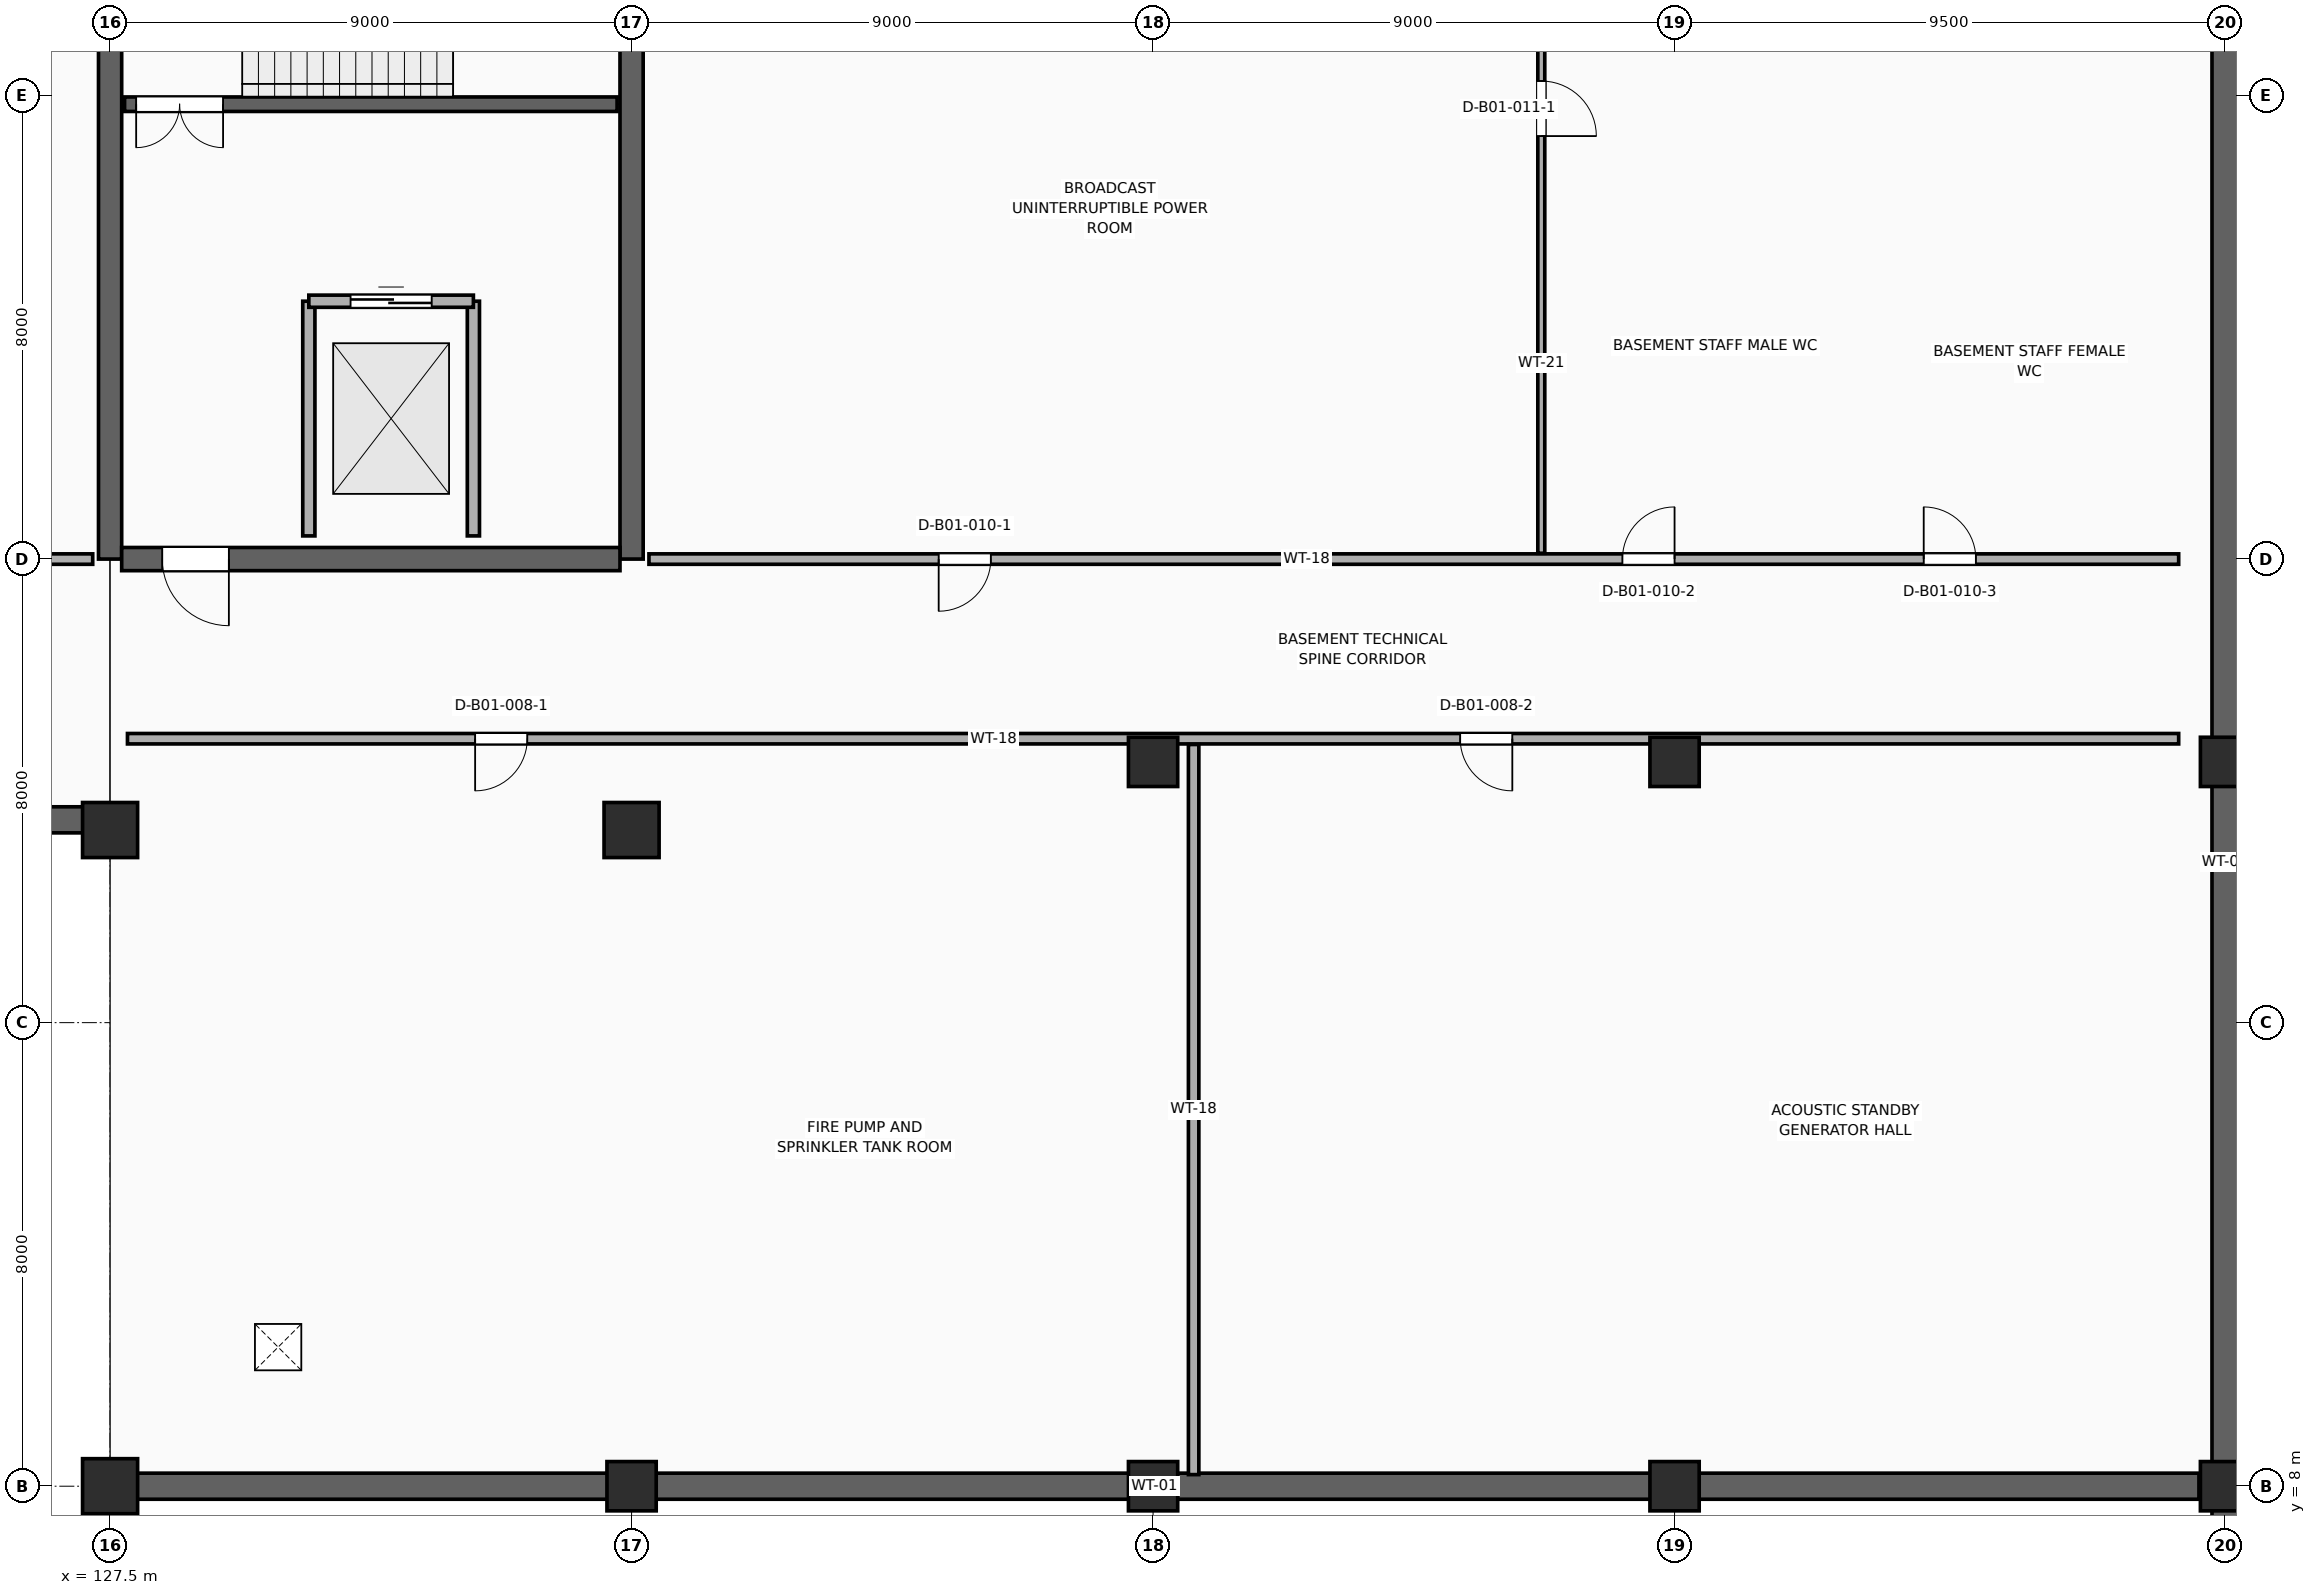
"""IFC4 building model, lengths in metres.
Left out: names, types, materials, properties, quantities, classifications, styles, units other than length and angle.
Written with IfcOpenShell. Run it as: python <this file> out.ifc"""

import sys

from ifc_helpers import new_model, si_unit, direction, frame, frame_2d, origin, origin_2d, place, context, subcontext, project, spatial, rectangle, extrude, element, fill, save


model = new_model("IFC4")
c1 = context("Model", 3, precision=1e-05, world=origin(), true_north=direction((0.0, 1.0)))
c2 = subcontext(c1, "Body", "Model", "MODEL_VIEW")
j1 = project(units=[si_unit("LENGTHUNIT", "METRE"), si_unit("PLANEANGLEUNIT", "RADIAN")], contexts=[c1])
p1 = place(None, origin())
s1 = spatial("IfcSite", under=j1, at=p1, CompositionType="ELEMENT")
p2 = place(p1, origin())
s2 = spatial("IfcBuilding", under=s1, at=p2, CompositionType="ELEMENT")
p3 = place(p2, frame((0.0, 0.0, -4.8)))
s3 = spatial("IfcBuildingStorey", under=s2, at=p3, CompositionType="ELEMENT", Elevation=-4.8)
p4 = place(p3, frame((76.5, 19.5, 0.0), z_axis=(0.0, 0.0, 1.0), x_axis=(1.0, 0.0, 0.0)))
e1 = element("IfcWall", 1, at=p4, inside=s3, PredefinedType="SHEAR", context=c2, shape_type="SweptSolid", body=[
    extrude(rectangle(XDim=51.0, YDim=0.45, at=frame_2d((25.5, 0.0))), origin(), (0.0, 0.0, 1.0), 4.42),
])
p5 = place(p3, frame((127.5, 8.0, 0.0), z_axis=(0.0, 0.0, 1.0), x_axis=(1.0, 0.0, 0.0)))
e2 = element("IfcWall", 2, at=p5, inside=s3, PredefinedType="SHEAR", context=c2, shape_type="SweptSolid", body=[
    extrude(rectangle(XDim=36.05, YDim=0.45, at=frame_2d((18.025, 0.0))), origin(), (0.0, 0.0, 1.0), 4.42),
])
p6 = place(p3, frame((164.0, 0.25, 0.0), z_axis=(0.0, 0.0, 1.0), x_axis=(0.0, 1.0, 0.0)))
e3 = element("IfcWall", 3, at=p6, inside=s3, PredefinedType="SHEAR", context=c2, shape_type="SweptSolid", body=[
    extrude(rectangle(XDim=113.5, YDim=0.45, at=frame_2d((56.75, 0.0))), origin(), (0.0, 0.0, 1.0), 4.42),
])
for number, where, z_axis, x_axis in (
    (4, (127.5, 24.0, 0.0), (0.0, 0.0, 1.0), (0.0, 1.0, 0.0)),
    (5, (136.5, 24.0, 0.0), (0.0, 0.0, 1.0), (0.0, 1.0, 0.0)),
):
    element("IfcWall", number, at=place(p3, frame(where, z_axis=z_axis, x_axis=x_axis)), inside=s3, PredefinedType="SHEAR", context=c2, shape_type="SweptSolid", body=[
        extrude(rectangle(XDim=12.8, YDim=0.4, at=frame_2d((6.4, 0.0))), origin(), (0.0, 0.0, 1.0), 4.64),
    ])
p7 = place(p3, frame((127.7, 24.0, 0.0), z_axis=(0.0, 0.0, 1.0), x_axis=(1.0, 0.0, 0.0)))
e6 = element("IfcWall", 6, at=p7, inside=s3, PredefinedType="SHEAR", context=c2, shape_type="SweptSolid", body=[
    extrude(rectangle(XDim=8.6, YDim=0.4, at=frame_2d((4.3, 0.0))), origin(), (0.0, 0.0, 1.0), 4.64),
])
p8 = place(p7, frame((0.7, 0.0, 0.0)))
e7 = element("IfcOpeningElement", 7, at=p8, cuts=e6, PredefinedType="OPENING", context=c2, shape_type="SweptSolid", body=[
    extrude(rectangle(XDim=1.15, YDim=2.2, at=frame_2d((0.575, 1.1))), frame((0.0, 0.212, 0.0), z_axis=(0.0, -1.0, 0.0), x_axis=(1.0, 0.0, 0.0)), (0.0, 0.0, 1.0), 0.424),
])
p9 = place(p3, frame((127.75, 31.85, 0.0), z_axis=(0.0, 0.0, 1.0), x_axis=(1.0, 0.0, 0.0)))
e8 = element("IfcWall", 8, at=p9, inside=s3, PredefinedType="STANDARD", context=c2, shape_type="SweptSolid", body=[
    extrude(rectangle(XDim=8.5, YDim=0.25, at=frame_2d((4.25, 0.0))), origin(), (0.0, 0.0, 1.0), 4.64),
])
p10 = place(p9, frame((0.2, 0.0, 0.0)))
e9 = element("IfcOpeningElement", 9, at=p10, cuts=e8, PredefinedType="OPENING", context=c2, shape_type="SweptSolid", body=[
    extrude(rectangle(XDim=1.5, YDim=2.2, at=frame_2d((0.75, 1.1))), frame((0.0, 0.137, 0.0), z_axis=(0.0, -1.0, 0.0), x_axis=(1.0, 0.0, 0.0)), (0.0, 0.0, 1.0), 0.274),
])
for number, where, z_axis, x_axis in (
    (10, (130.93, 24.4, 0.0), (0.0, 0.0, 1.0), (0.0, 1.0, 0.0)),
    (11, (133.77, 24.4, 0.0), (0.0, 0.0, 1.0), (0.0, 1.0, 0.0)),
):
    element("IfcWall", number, at=place(p3, frame(where, z_axis=z_axis, x_axis=x_axis)), inside=s3, PredefinedType="PARTITIONING", context=c2, shape_type="SweptSolid", body=[
        extrude(rectangle(XDim=4.05, YDim=0.21, at=frame_2d((2.025, 0.0))), origin(), (0.0, 0.0, 1.0), 4.64),
    ])
p11 = place(p3, frame((130.93, 28.45, 0.0), z_axis=(0.0, 0.0, 1.0), x_axis=(1.0, 0.0, 0.0)))
e12 = element("IfcWall", 12, at=p11, inside=s3, PredefinedType="PARTITIONING", context=c2, shape_type="SweptSolid", body=[
    extrude(rectangle(XDim=2.84, YDim=0.21, at=frame_2d((1.42, 0.0))), origin(), (0.0, 0.0, 1.0), 4.64),
])
p12 = place(p11, frame((0.72, 0.0, 0.0)))
e13 = element("IfcOpeningElement", 13, at=p12, cuts=e12, PredefinedType="OPENING", context=c2, shape_type="SweptSolid", body=[
    extrude(rectangle(XDim=1.4, YDim=2.35, at=frame_2d((0.7, 1.175))), frame((0.0, 0.117, 0.0), z_axis=(0.0, -1.0, 0.0), x_axis=(1.0, 0.0, 0.0)), (0.0, 0.0, 1.0), 0.234),
])
p13 = place(p3, frame((127.5, 8.0, 0.0), z_axis=(0.0, 0.0, 1.0), x_axis=(1.0, 0.0, 0.0)))
e14 = element("IfcColumn", 14, at=p13, inside=s3, PredefinedType="COLUMN", context=c2, shape_type="SweptSolid", body=[
    extrude(rectangle(XDim=0.95, YDim=0.95, at=origin_2d()), origin(), (0.0, 0.0, 1.0), 4.42),
])
for number, where, z_axis, x_axis in (
    (15, (136.5, 8.0, 0.0), (0.0, 0.0, 1.0), (1.0, 0.0, 0.0)),
    (16, (145.5, 8.0, 0.0), (0.0, 0.0, 1.0), (1.0, 0.0, 0.0)),
    (17, (145.5, 20.5, 0.0), (0.0, 0.0, 1.0), (1.0, 0.0, 0.0)),
    (18, (154.5, 8.0, 0.0), (0.0, 0.0, 1.0), (1.0, 0.0, 0.0)),
    (19, (154.5, 20.5, 0.0), (0.0, 0.0, 1.0), (1.0, 0.0, 0.0)),
    (20, (164.0, 8.0, 0.0), (0.0, 0.0, 1.0), (1.0, 0.0, 0.0)),
    (21, (164.0, 20.5, 0.0), (0.0, 0.0, 1.0), (1.0, 0.0, 0.0)),
):
    element("IfcColumn", number, at=place(p3, frame(where, z_axis=z_axis, x_axis=x_axis)), inside=s3, PredefinedType="COLUMN", context=c2, shape_type="SweptSolid", body=[
        extrude(rectangle(XDim=0.85, YDim=0.85, at=origin_2d()), origin(), (0.0, 0.0, 1.0), 4.42),
    ])
for number, where, z_axis, x_axis in (
    (22, (136.5, 19.324, 0.0), (0.0, 0.0, 1.0), (1.0, 0.0, 0.0)),
    (23, (127.5, 19.324, 0.0), (0.0, 0.0, 1.0), (1.0, 0.0, 0.0)),
):
    element("IfcColumn", number, at=place(p3, frame(where, z_axis=z_axis, x_axis=x_axis)), inside=s3, PredefinedType="COLUMN", context=c2, shape_type="SweptSolid", body=[
        extrude(rectangle(XDim=0.95, YDim=0.95, at=origin_2d()), origin(), (0.0, 0.0, 1.0), 4.42),
    ])
p14 = place(p3, frame((76.8, 24.0, 0.0), z_axis=(0.0, 0.0, 1.0), x_axis=(1.0, 0.0, 0.0)))
e24 = element("IfcWall", 24, at=p14, inside=s3, PredefinedType="PARTITIONING", context=c2, shape_type="SweptSolid", body=[
    extrude(rectangle(XDim=50.4, YDim=0.18, at=frame_2d((25.2, 0.0))), origin(), (0.0, 0.0, 1.0), 3.56),
])
p15 = place(p14, frame((8.0, 0.0, 0.0)))
e25 = element("IfcOpeningElement", 25, at=p15, cuts=e24, PredefinedType="OPENING", context=c2, shape_type="SweptSolid", body=[
    extrude(rectangle(XDim=0.9, YDim=2.1, at=frame_2d((0.45, 1.05))), frame((0.0, 0.102, 0.0), z_axis=(0.0, -1.0, 0.0), x_axis=(1.0, 0.0, 0.0)), (0.0, 0.0, 1.0), 0.204),
])
p16 = place(p14, frame((34.0, 0.0, 0.0)))
e26 = element("IfcOpeningElement", 26, at=p16, cuts=e24, PredefinedType="OPENING", context=c2, shape_type="SweptSolid", body=[
    extrude(rectangle(XDim=0.9, YDim=2.1, at=frame_2d((0.45, 1.05))), frame((0.0, 0.102, 0.0), z_axis=(0.0, -1.0, 0.0), x_axis=(1.0, 0.0, 0.0)), (0.0, 0.0, 1.0), 0.204),
])
p17 = place(p3, frame((127.8, 20.9, 0.0), z_axis=(0.0, 0.0, 1.0), x_axis=(1.0, 0.0, 0.0)))
e27 = element("IfcWall", 27, at=p17, inside=s3, PredefinedType="PARTITIONING", context=c2, shape_type="SweptSolid", body=[
    extrude(rectangle(XDim=35.4, YDim=0.18, at=frame_2d((17.7, 0.0))), origin(), (0.0, 0.0, 1.0), 3.51),
])
p18 = place(p17, frame((6.0, 0.0, 0.0)))
e28 = element("IfcOpeningElement", 28, at=p18, cuts=e27, PredefinedType="OPENING", context=c2, shape_type="SweptSolid", body=[
    extrude(rectangle(XDim=0.9, YDim=2.1, at=frame_2d((0.45, 1.05))), frame((0.0, 0.102, 0.0), z_axis=(0.0, -1.0, 0.0), x_axis=(1.0, 0.0, 0.0)), (0.0, 0.0, 1.0), 0.204),
])
p19 = place(p17, frame((23.0, 0.0, 0.0)))
e29 = element("IfcOpeningElement", 29, at=p19, cuts=e27, PredefinedType="OPENING", context=c2, shape_type="SweptSolid", body=[
    extrude(rectangle(XDim=0.9, YDim=2.1, at=frame_2d((0.45, 1.05))), frame((0.0, 0.102, 0.0), z_axis=(0.0, -1.0, 0.0), x_axis=(1.0, 0.0, 0.0)), (0.0, 0.0, 1.0), 0.204),
])
p20 = place(p3, frame((146.2, 8.2, 0.0), z_axis=(0.0, 0.0, 1.0), x_axis=(0.0, 1.0, 0.0)))
e30 = element("IfcWall", 30, at=p20, inside=s3, PredefinedType="PARTITIONING", context=c2, shape_type="SweptSolid", body=[
    extrude(rectangle(XDim=12.6, YDim=0.18, at=frame_2d((6.3, 0.0))), origin(), (0.0, 0.0, 1.0), 3.56),
])
p21 = place(p3, frame((136.8, 24.0, 0.0), z_axis=(0.0, 0.0, 1.0), x_axis=(1.0, 0.0, 0.0)))
e31 = element("IfcWall", 31, at=p21, inside=s3, PredefinedType="PARTITIONING", context=c2, shape_type="SweptSolid", body=[
    extrude(rectangle(XDim=26.4, YDim=0.18, at=frame_2d((13.2, 0.0))), origin(), (0.0, 0.0, 1.0), 3.51),
])
p22 = place(p21, frame((5.0, 0.0, 0.0)))
e32 = element("IfcOpeningElement", 32, at=p22, cuts=e31, PredefinedType="OPENING", context=c2, shape_type="SweptSolid", body=[
    extrude(rectangle(XDim=0.9, YDim=2.1, at=frame_2d((0.45, 1.05))), frame((0.0, 0.102, 0.0), z_axis=(0.0, -1.0, 0.0), x_axis=(1.0, 0.0, 0.0)), (0.0, 0.0, 1.0), 0.204),
])
p23 = place(p21, frame((16.8, 0.0, 0.0)))
e33 = element("IfcOpeningElement", 33, at=p23, cuts=e31, PredefinedType="OPENING", context=c2, shape_type="SweptSolid", body=[
    extrude(rectangle(XDim=0.9, YDim=2.15, at=frame_2d((0.45, 1.075))), frame((0.0, 0.102, 0.0), z_axis=(0.0, -1.0, 0.0), x_axis=(1.0, 0.0, 0.0)), (0.0, 0.0, 1.0), 0.204),
])
p24 = place(p21, frame((22.0, 0.0, 0.0)))
e34 = element("IfcOpeningElement", 34, at=p24, cuts=e31, PredefinedType="OPENING", context=c2, shape_type="SweptSolid", body=[
    extrude(rectangle(XDim=0.9, YDim=2.15, at=frame_2d((0.45, 1.075))), frame((0.0, 0.102, 0.0), z_axis=(0.0, -1.0, 0.0), x_axis=(1.0, 0.0, 0.0)), (0.0, 0.0, 1.0), 0.204),
])
p25 = place(p3, frame((152.2, 24.1, 0.0), z_axis=(0.0, 0.0, 1.0), x_axis=(0.0, 1.0, 0.0)))
e35 = element("IfcWall", 35, at=p25, inside=s3, PredefinedType="PARTITIONING", context=c2, shape_type="SweptSolid", body=[
    extrude(rectangle(XDim=12.5, YDim=0.12, at=frame_2d((6.25, 0.0))), origin(), (0.0, 0.0, 1.0), 3.56),
])
p26 = place(p25, frame((7.2, 0.0, 0.0)))
e36 = element("IfcOpeningElement", 36, at=p26, cuts=e35, PredefinedType="OPENING", context=c2, shape_type="SweptSolid", body=[
    extrude(rectangle(XDim=0.95, YDim=2.15, at=frame_2d((0.475, 1.075))), frame((0.0, 0.072, 0.0), z_axis=(0.0, -1.0, 0.0), x_axis=(1.0, 0.0, 0.0)), (0.0, 0.0, 1.0), 0.144),
])
p27 = place(p10, frame((1.5, 0.0, 0.0), z_axis=(0.0, 0.0, 1.0), x_axis=(-1.0, 0.0, 0.0)))
e37 = element("IfcDoor", 37, at=p27, inside=s3, OperationType="DOUBLE_DOOR_SINGLE_SWING", PredefinedType="DOOR", context=c2, shape_type="SweptSolid", body=[
    extrude(rectangle(XDim=1.5, YDim=2.2, at=frame_2d((0.75, 1.1))), frame((0.0, 0.025, 0.0), z_axis=(0.0, -1.0, 0.0), x_axis=(1.0, 0.0, 0.0)), (0.0, 0.0, 1.0), 0.05),
])
fill(e9, e37)
p28 = place(p12, origin())
e38 = element("IfcDoor", 38, at=p28, inside=s3, OperationType="DOUBLE_DOOR_SLIDING", PredefinedType="DOOR", context=c2, shape_type="SweptSolid", body=[
    extrude(rectangle(XDim=1.4, YDim=2.35, at=frame_2d((0.7, 1.175))), frame((0.0, 0.025, 0.0), z_axis=(0.0, -1.0, 0.0), x_axis=(1.0, 0.0, 0.0)), (0.0, 0.0, 1.0), 0.05),
])
fill(e13, e38)
p29 = place(p8, frame((1.15, 0.0, 0.0), z_axis=(0.0, 0.0, 1.0), x_axis=(-1.0, 0.0, 0.0)))
e39 = element("IfcDoor", 39, at=p29, inside=s3, OperationType="SINGLE_SWING_RIGHT", PredefinedType="DOOR", context=c2, shape_type="SweptSolid", body=[
    extrude(rectangle(XDim=1.15, YDim=2.2, at=frame_2d((0.575, 1.1))), frame((0.0, 0.025, 0.0), z_axis=(0.0, -1.0, 0.0), x_axis=(1.0, 0.0, 0.0)), (0.0, 0.0, 1.0), 0.05),
])
fill(e7, e39)
p30 = place(p18, frame((0.9, 0.0, 0.0), z_axis=(0.0, 0.0, 1.0), x_axis=(-1.0, 0.0, 0.0)))
e40 = element("IfcDoor", 40, at=p30, inside=s3, OperationType="SINGLE_SWING_LEFT", PredefinedType="DOOR", context=c2, shape_type="SweptSolid", body=[
    extrude(rectangle(XDim=0.9, YDim=2.1, at=frame_2d((0.45, 1.05))), frame((0.0, 0.025, 0.0), z_axis=(0.0, -1.0, 0.0), x_axis=(1.0, 0.0, 0.0)), (0.0, 0.0, 1.0), 0.05),
])
fill(e28, e40)
p31 = place(p19, frame((0.9, 0.0, 0.0), z_axis=(0.0, 0.0, 1.0), x_axis=(-1.0, 0.0, 0.0)))
e41 = element("IfcDoor", 41, at=p31, inside=s3, OperationType="SINGLE_SWING_RIGHT", PredefinedType="DOOR", context=c2, shape_type="SweptSolid", body=[
    extrude(rectangle(XDim=0.9, YDim=2.1, at=frame_2d((0.45, 1.05))), frame((0.0, 0.025, 0.0), z_axis=(0.0, -1.0, 0.0), x_axis=(1.0, 0.0, 0.0)), (0.0, 0.0, 1.0), 0.05),
])
fill(e29, e41)
p32 = place(p22, frame((0.9, 0.0, 0.0), z_axis=(0.0, 0.0, 1.0), x_axis=(-1.0, 0.0, 0.0)))
e42 = element("IfcDoor", 42, at=p32, inside=s3, OperationType="SINGLE_SWING_LEFT", PredefinedType="DOOR", context=c2, shape_type="SweptSolid", body=[
    extrude(rectangle(XDim=0.9, YDim=2.1, at=frame_2d((0.45, 1.05))), frame((0.0, 0.025, 0.0), z_axis=(0.0, -1.0, 0.0), x_axis=(1.0, 0.0, 0.0)), (0.0, 0.0, 1.0), 0.05),
])
fill(e32, e42)
p33 = place(p23, origin())
e43 = element("IfcDoor", 43, at=p33, inside=s3, OperationType="SINGLE_SWING_RIGHT", PredefinedType="DOOR", context=c2, shape_type="SweptSolid", body=[
    extrude(rectangle(XDim=0.9, YDim=2.15, at=frame_2d((0.45, 1.075))), frame((0.0, 0.025, 0.0), z_axis=(0.0, -1.0, 0.0), x_axis=(1.0, 0.0, 0.0)), (0.0, 0.0, 1.0), 0.05),
])
fill(e33, e43)
p34 = place(p24, origin())
e44 = element("IfcDoor", 44, at=p34, inside=s3, OperationType="SINGLE_SWING_LEFT", PredefinedType="DOOR", context=c2, shape_type="SweptSolid", body=[
    extrude(rectangle(XDim=0.9, YDim=2.15, at=frame_2d((0.45, 1.075))), frame((0.0, 0.025, 0.0), z_axis=(0.0, -1.0, 0.0), x_axis=(1.0, 0.0, 0.0)), (0.0, 0.0, 1.0), 0.05),
])
fill(e34, e44)
p35 = place(p26, frame((0.95, 0.0, 0.0), z_axis=(0.0, 0.0, 1.0), x_axis=(-1.0, 0.0, 0.0)))
e45 = element("IfcDoor", 45, at=p35, inside=s3, OperationType="SINGLE_SWING_LEFT", PredefinedType="DOOR", context=c2, shape_type="SweptSolid", body=[
    extrude(rectangle(XDim=0.95, YDim=2.15, at=frame_2d((0.475, 1.075))), frame((0.0, 0.025, 0.0), z_axis=(0.0, -1.0, 0.0), x_axis=(1.0, 0.0, 0.0)), (0.0, 0.0, 1.0), 0.05),
])
fill(e36, e45)
save(model, sys.argv[1])
